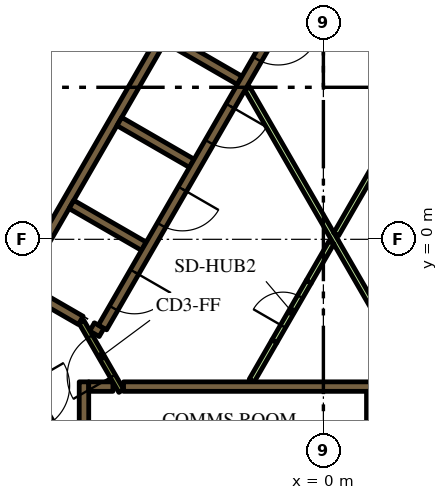
"""IFC4 building model, lengths in metres.
Left out: names, types, materials, properties, quantities, classifications, styles, units other than length and angle.
Written with IfcOpenShell. Run it as: python <this file> out.ifc"""

import sys

from ifc_helpers import new_model, si_unit, direction, frame, frame_2d, origin, place, context, subcontext, project, spatial, rectangle, extrude, element, fill, save


model = new_model("IFC4")
c1 = context("Model", 3, precision=1e-05, world=origin(), true_north=direction((0.0, 1.0)))
c2 = subcontext(c1, "Body", "Model", "MODEL_VIEW")
j1 = project(units=[si_unit("LENGTHUNIT", "METRE"), si_unit("PLANEANGLEUNIT", "RADIAN")], contexts=[c1])
p1 = place(None, origin())
s1 = spatial("IfcSite", under=j1, at=p1, CompositionType="ELEMENT")
p2 = place(p1, origin())
s2 = spatial("IfcBuilding", under=s1, at=p2, CompositionType="ELEMENT")
p3 = place(p2, frame((0.0, 0.0, 47.1)))
s3 = spatial("IfcBuildingStorey", under=s2, at=p3, CompositionType="ELEMENT", Elevation=47.1)
p4 = place(p3, frame((-15.36, -1.503, 0.0), z_axis=(0.0, 0.0, 1.0), x_axis=(0.50000389221, 0.866023156604, 0.0)))
e1 = element("IfcWall", 1, at=p4, inside=s3, PredefinedType="SOLIDWALL", context=c2, shape_type="SweptSolid", body=[
    extrude(rectangle(XDim=21.0, YDim=0.9, at=frame_2d((10.5, 0.0))), origin(), (0.0, 0.0, 1.0), 3.9),
])
p5 = place(p3, frame((-5.259, -3.875, 0.0), z_axis=(0.0, 0.0, 1.0), x_axis=(1.0, 0.0, 0.0)))
e2 = element("IfcWall", 2, at=p5, inside=s3, PredefinedType="SOLIDWALL", context=c2, shape_type="SweptSolid", body=[
    extrude(rectangle(XDim=10.489, YDim=0.25, at=frame_2d((5.244, 0.0))), origin(), (0.0, 0.0, 1.0), 3.9),
])
p6 = place(p3, frame((1.26, -4.0, 0.0), z_axis=(0.0, 0.0, 1.0), x_axis=(0.0, -1.0, 0.0)))
e3 = element("IfcWall", 3, at=p6, inside=s3, PredefinedType="SOLIDWALL", context=c2, shape_type="SweptSolid", body=[
    extrude(rectangle(XDim=2.2, YDim=0.25, at=frame_2d((1.1, 0.0))), origin(), (0.0, 0.0, 1.0), 3.9),
])
p7 = place(p3, frame((-6.3, -3.75, 0.0), z_axis=(0.0, 0.0, 1.0), x_axis=(0.0, -1.0, 0.0)))
e4 = element("IfcWall", 4, at=p7, inside=s3, PredefinedType="SOLIDWALL", context=c2, shape_type="SweptSolid", body=[
    extrude(rectangle(XDim=3.404, YDim=0.25, at=frame_2d((1.702, 0.0))), origin(), (0.0, 0.0, 1.0), 3.9),
])
p8 = place(p3, frame((-6.175, -3.875, 0.0), z_axis=(0.0, 0.0, 1.0), x_axis=(1.0, 0.0, 0.0)))
e5 = element("IfcWall", 5, at=p8, inside=s3, PredefinedType="SOLIDWALL", context=c2, shape_type="SweptSolid", body=[
    extrude(rectangle(XDim=0.637, YDim=0.25, at=frame_2d((0.318, 0.0))), origin(), (0.0, 0.0, 1.0), 3.9),
])
p9 = place(p3, frame((5.97, -2.591, 0.0), z_axis=(0.0, 0.0, 1.0), x_axis=(-0.499994469932, 0.866028596547, 0.0)))
e6 = element("IfcWall", 6, at=p9, inside=s3, PredefinedType="SOLIDWALL", context=c2, shape_type="SweptSolid", body=[
    extrude(rectangle(XDim=10.488, YDim=0.25, at=frame_2d((5.244, 0.0))), origin(), (0.0, 0.0, 1.0), 3.9),
])
p10 = place(p3, frame((-8.06, -1.311, 0.0), z_axis=(0.0, 0.0, 1.0), x_axis=(0.50000273126, 0.866023826885, 0.0)))
e7 = element("IfcWall", 7, at=p10, inside=s3, PredefinedType="SOLIDWALL", context=c2, shape_type="SweptSolid", body=[
    extrude(rectangle(XDim=10.33, YDim=0.25, at=frame_2d((5.165, 0.0))), origin(), (0.0, 0.0, 1.0), 3.9),
])
for number, where, z_axis, x_axis in (
    (8, (-2.204, 4.182, 0.0), (0.0, 0.0, 1.0), (-0.866, 0.5, 0.0)),
    (9, (-5.369, 3.1, 0.0), (0.0, 0.0, 1.0), (0.866, -0.5, 0.0)),
    (10, (-4.724, -0.182, 0.0), (0.0, 0.0, 1.0), (-0.866, 0.5, 0.0)),
):
    element("IfcWall", number, at=place(p3, frame(where, z_axis=z_axis, x_axis=x_axis)), inside=s3, PredefinedType="SOLIDWALL", context=c2, shape_type="SweptSolid", body=[
        extrude(rectangle(XDim=2.2, YDim=0.25, at=frame_2d((1.1, 0.0))), origin(), (0.0, 0.0, 1.0), 3.9),
    ])
p11 = place(p3, frame((-6.088, -2.305, 0.0), z_axis=(0.0, 0.0, 1.0), x_axis=(0.866059450854, -0.499941024108, 0.0)))
e11 = element("IfcWall", 11, at=p11, inside=s3, PredefinedType="SOLIDWALL", context=c2, shape_type="SweptSolid", body=[
    extrude(rectangle(XDim=0.29, YDim=0.25, at=frame_2d((0.145, 0.0))), origin(), (0.0, 0.0, 1.0), 3.9),
])
p12 = place(p3, frame((-7.889, -1.265, 0.0), z_axis=(0.0, 0.0, 1.0), x_axis=(0.865986741702, -0.500066958712, 0.0)))
e12 = element("IfcWall", 12, at=p12, inside=s3, PredefinedType="SOLIDWALL", context=c2, shape_type="SweptSolid", body=[
    extrude(rectangle(XDim=1.738, YDim=0.25, at=frame_2d((0.869, 0.0))), origin(), (0.0, 0.0, 1.0), 3.9),
])
p13 = place(p3, frame((-1.887, -3.718, 0.0), z_axis=(0.0, 0.0, 1.0), x_axis=(0.500057179532, 0.865992388649, 0.0)))
e13 = element("IfcWall", 13, at=p13, inside=s3, PredefinedType="PARTITIONING", context=c2, shape_type="SweptSolid", body=[
    extrude(rectangle(XDim=1.199, YDim=0.15, at=frame_2d((0.6, 0.0))), origin(), (0.0, 0.0, 1.0), 2.75),
])
p14 = place(p3, frame((2.435, -3.718, 0.0), z_axis=(0.0, 0.0, 1.0), x_axis=(-0.499985176046, 0.866033962229, 0.0)))
e14 = element("IfcWall", 14, at=p14, inside=s3, PredefinedType="PARTITIONING", context=c2, shape_type="SweptSolid", body=[
    extrude(rectangle(XDim=8.875, YDim=0.15, at=frame_2d((4.438, 0.0))), origin(), (0.0, 0.0, 1.0), 2.75),
])
p15 = place(p3, frame((0.336, 0.132, 0.0), z_axis=(0.0, 0.0, 1.0), x_axis=(0.500001957507, 0.866024273614, 0.0)))
e15 = element("IfcWall", 15, at=p15, inside=s3, PredefinedType="PARTITIONING", context=c2, shape_type="SweptSolid", body=[
    extrude(rectangle(XDim=3.881, YDim=0.15, at=frame_2d((1.941, 0.0))), origin(), (0.0, 0.0, 1.0), 2.75),
])
p16 = place(p3, frame((-0.387, -1.121, 0.0), z_axis=(0.0, 0.0, 1.0), x_axis=(0.500057179532, 0.865992388649, 0.0)))
e16 = element("IfcWall", 16, at=p16, inside=s3, PredefinedType="PARTITIONING", context=c2, shape_type="SweptSolid", body=[
    extrude(rectangle(XDim=1.199, YDim=0.15, at=frame_2d((0.6, 0.0))), origin(), (0.0, 0.0, 1.0), 2.75),
])
p17 = place(p3, frame((-6.008, 9.144, 0.0), z_axis=(0.0, 0.0, 1.0), x_axis=(-0.500006956611, -0.866021387346, 0.0)))
e17 = element("IfcWall", 17, at=p17, inside=s3, PredefinedType="SOLIDWALL", context=c2, shape_type="SweptSolid", body=[
    extrude(rectangle(XDim=9.83, YDim=0.25, at=frame_2d((4.915, 0.0))), origin(), (0.0, 0.0, 1.0), 3.9),
])
p18 = place(p17, frame((6.985, 0.0, 0.0)))
e18 = element("IfcOpeningElement", 18, at=p18, cuts=e17, PredefinedType="OPENING", context=c2, shape_type="SweptSolid", body=[
    extrude(rectangle(XDim=0.9, YDim=2.1, at=frame_2d((0.45, 1.05))), frame((0.0, 0.135, 0.0), z_axis=(0.0, -1.0, 0.0), x_axis=(1.0, 0.0, 0.0)), (0.0, 0.0, 1.0), 0.27),
])
p19 = place(p3, frame((-0.898, 6.194, 0.0), z_axis=(0.0, 0.0, 1.0), x_axis=(-0.499996202215, -0.866027596426, 0.0)))
e19 = element("IfcWall", 19, at=p19, inside=s3, PredefinedType="SOLIDWALL", context=c2, shape_type="SweptSolid", body=[
    extrude(rectangle(XDim=9.83, YDim=0.25, at=frame_2d((4.915, 0.0))), origin(), (0.0, 0.0, 1.0), 3.9),
])
p20 = place(p19, frame((0.585, 0.0, 0.0)))
e20 = element("IfcOpeningElement", 20, at=p20, cuts=e19, PredefinedType="OPENING", context=c2, shape_type="SweptSolid", body=[
    extrude(rectangle(XDim=1.1, YDim=2.1, at=frame_2d((0.55, 1.05))), frame((0.0, 0.135, 0.0), z_axis=(0.0, -1.0, 0.0), x_axis=(1.0, 0.0, 0.0)), (0.0, 0.0, 1.0), 0.27),
])
p21 = place(p19, frame((3.105, 0.0, 0.0)))
e21 = element("IfcOpeningElement", 21, at=p21, cuts=e19, PredefinedType="OPENING", context=c2, shape_type="SweptSolid", body=[
    extrude(rectangle(XDim=1.1, YDim=2.1, at=frame_2d((0.55, 1.05))), frame((0.0, 0.135, 0.0), z_axis=(0.0, -1.0, 0.0), x_axis=(1.0, 0.0, 0.0)), (0.0, 0.0, 1.0), 0.27),
])
p22 = place(p19, frame((5.625, 0.0, 0.0)))
e22 = element("IfcOpeningElement", 22, at=p22, cuts=e19, PredefinedType="OPENING", context=c2, shape_type="SweptSolid", body=[
    extrude(rectangle(XDim=1.1, YDim=2.1, at=frame_2d((0.55, 1.05))), frame((0.0, 0.135, 0.0), z_axis=(0.0, -1.0, 0.0), x_axis=(1.0, 0.0, 0.0)), (0.0, 0.0, 1.0), 0.27),
])
p23 = place(p19, frame((8.145, 0.0, 0.0)))
e23 = element("IfcOpeningElement", 23, at=p23, cuts=e19, PredefinedType="OPENING", context=c2, shape_type="SweptSolid", body=[
    extrude(rectangle(XDim=1.1, YDim=2.1, at=frame_2d((0.55, 1.05))), frame((0.0, 0.135, 0.0), z_axis=(0.0, -1.0, 0.0), x_axis=(1.0, 0.0, 0.0)), (0.0, 0.0, 1.0), 0.27),
])
p24 = place(p3, frame((-8.103, -3.466, 0.0), z_axis=(0.0, 0.0, 1.0), x_axis=(0.500078061341, -0.865980330357, 0.0)))
e24 = element("IfcWall", 24, at=p24, inside=s3, PredefinedType="SOLIDWALL", context=c2, shape_type="SweptSolid", body=[
    extrude(rectangle(XDim=2.1, YDim=0.4, at=frame_2d((1.05, 0.0))), origin(), (0.0, 0.0, 1.0), 3.9),
])
p25 = place(p24, frame((0.45, 0.0, 0.0)))
e25 = element("IfcOpeningElement", 25, at=p25, cuts=e24, PredefinedType="OPENING", context=c2, shape_type="SweptSolid", body=[
    extrude(rectangle(XDim=1.2, YDim=2.1, at=frame_2d((0.6, 1.05))), frame((0.0, 0.21, 0.0), z_axis=(0.0, -1.0, 0.0), x_axis=(1.0, 0.0, 0.0)), (0.0, 0.0, 1.0), 0.42),
])
p26 = place(p3, frame((-5.317, -3.99, 0.0), z_axis=(0.0, 0.0, 1.0), x_axis=(-0.500027713859, 0.866009402589, 0.0)))
e26 = element("IfcWall", 26, at=p26, inside=s3, PredefinedType="PARTITIONING", context=c2, shape_type="SweptSolid", body=[
    extrude(rectangle(XDim=2.1, YDim=0.15, at=frame_2d((1.05, 0.0))), origin(), (0.0, 0.0, 1.0), 3.9),
])
p27 = place(p26, frame((0.45, 0.0, 0.0)))
e27 = element("IfcOpeningElement", 27, at=p27, cuts=e26, PredefinedType="OPENING", context=c2, shape_type="SweptSolid", body=[
    extrude(rectangle(XDim=1.2, YDim=2.1, at=frame_2d((0.6, 1.05))), frame((0.0, 0.085, 0.0), z_axis=(0.0, -1.0, 0.0), x_axis=(1.0, 0.0, 0.0)), (0.0, 0.0, 1.0), 0.17),
])
p28 = place(p3, frame((-1.287, -2.679, 0.0), z_axis=(0.0, 0.0, 1.0), x_axis=(0.499961193289, 0.866047807691, 0.0)))
e28 = element("IfcWall", 28, at=p28, inside=s3, PredefinedType="PARTITIONING", context=c2, shape_type="SweptSolid", body=[
    extrude(rectangle(XDim=1.8, YDim=0.15, at=frame_2d((0.9, 0.0))), origin(), (0.0, 0.0, 1.0), 2.75),
])
p29 = place(p28, frame((0.45, 0.0, 0.0)))
e29 = element("IfcOpeningElement", 29, at=p29, cuts=e28, PredefinedType="OPENING", context=c2, shape_type="SweptSolid", body=[
    extrude(rectangle(XDim=0.9, YDim=2.1, at=frame_2d((0.45, 1.05))), frame((0.0, 0.085, 0.0), z_axis=(0.0, -1.0, 0.0), x_axis=(1.0, 0.0, 0.0)), (0.0, 0.0, 1.0), 0.17),
])
p30 = place(p3, frame((-19.081, -3.9, 0.0), z_axis=(0.0, 0.0, 1.0), x_axis=(0.499998313975, 0.866026377209, 0.0)))
e30 = element("IfcWall", 30, at=p30, inside=s3, PredefinedType="PARTITIONING", context=c2, shape_type="SweptSolid", body=[
    extrude(rectangle(XDim=25.766, YDim=0.15, at=frame_2d((12.883, 0.0))), origin(), (0.0, 0.0, 1.0), 2.75),
])
p31 = place(p30, frame((16.196, 0.0, 0.0)))
e31 = element("IfcOpeningElement", 31, at=p31, cuts=e30, PredefinedType="OPENING", context=c2, shape_type="SweptSolid", body=[
    extrude(rectangle(XDim=1.0, YDim=2.1, at=frame_2d((0.5, 1.05))), frame((0.0, 0.085, 0.0), z_axis=(0.0, -1.0, 0.0), x_axis=(1.0, 0.0, 0.0)), (0.0, 0.0, 1.0), 0.17),
])
p32 = place(p30, frame((14.889, 0.0, 0.0)))
e32 = element("IfcOpeningElement", 32, at=p32, cuts=e30, PredefinedType="OPENING", context=c2, shape_type="SweptSolid", body=[
    extrude(rectangle(XDim=1.0, YDim=2.1, at=frame_2d((0.5, 1.05))), frame((0.0, 0.085, 0.0), z_axis=(0.0, -1.0, 0.0), x_axis=(1.0, 0.0, 0.0)), (0.0, 0.0, 1.0), 0.17),
])
p33 = place(p30, frame((3.698, 0.0, 0.0)))
e33 = element("IfcOpeningElement", 33, at=p33, cuts=e30, PredefinedType="OPENING", context=c2, shape_type="SweptSolid", body=[
    extrude(rectangle(XDim=1.1, YDim=2.1, at=frame_2d((0.55, 1.05))), frame((0.0, 0.085, 0.0), z_axis=(0.0, -1.0, 0.0), x_axis=(1.0, 0.0, 0.0)), (0.0, 0.0, 1.0), 0.17),
])
p34 = place(p30, frame((2.392, 0.0, 0.0)))
e34 = element("IfcOpeningElement", 34, at=p34, cuts=e30, PredefinedType="OPENING", context=c2, shape_type="SweptSolid", body=[
    extrude(rectangle(XDim=1.0, YDim=2.1, at=frame_2d((0.5, 1.05))), frame((0.0, 0.085, 0.0), z_axis=(0.0, -1.0, 0.0), x_axis=(1.0, 0.0, 0.0)), (0.0, 0.0, 1.0), 0.17),
])
p35 = place(p20, origin())
e35 = element("IfcDoor", 35, at=p35, inside=s3, OperationType="DOUBLE_DOOR_SLIDING", PredefinedType="DOOR", context=c2, shape_type="SweptSolid", body=[
    extrude(rectangle(XDim=1.1, YDim=2.1, at=frame_2d((0.55, 1.05))), frame((0.0, 0.025, 0.0), z_axis=(0.0, -1.0, 0.0), x_axis=(1.0, 0.0, 0.0)), (0.0, 0.0, 1.0), 0.05),
])
fill(e20, e35)
p36 = place(p21, origin())
e36 = element("IfcDoor", 36, at=p36, inside=s3, OperationType="DOUBLE_DOOR_SLIDING", PredefinedType="DOOR", context=c2, shape_type="SweptSolid", body=[
    extrude(rectangle(XDim=1.1, YDim=2.1, at=frame_2d((0.55, 1.05))), frame((0.0, 0.025, 0.0), z_axis=(0.0, -1.0, 0.0), x_axis=(1.0, 0.0, 0.0)), (0.0, 0.0, 1.0), 0.05),
])
fill(e21, e36)
p37 = place(p22, origin())
e37 = element("IfcDoor", 37, at=p37, inside=s3, OperationType="DOUBLE_DOOR_SLIDING", PredefinedType="DOOR", context=c2, shape_type="SweptSolid", body=[
    extrude(rectangle(XDim=1.1, YDim=2.1, at=frame_2d((0.55, 1.05))), frame((0.0, 0.025, 0.0), z_axis=(0.0, -1.0, 0.0), x_axis=(1.0, 0.0, 0.0)), (0.0, 0.0, 1.0), 0.05),
])
fill(e22, e37)
p38 = place(p23, origin())
e38 = element("IfcDoor", 38, at=p38, inside=s3, OperationType="DOUBLE_DOOR_SLIDING", PredefinedType="DOOR", context=c2, shape_type="SweptSolid", body=[
    extrude(rectangle(XDim=1.1, YDim=2.1, at=frame_2d((0.55, 1.05))), frame((0.0, 0.025, 0.0), z_axis=(0.0, -1.0, 0.0), x_axis=(1.0, 0.0, 0.0)), (0.0, 0.0, 1.0), 0.05),
])
fill(e23, e38)
p39 = place(p27, origin())
e39 = element("IfcDoor", 39, at=p39, inside=s3, OperationType="SINGLE_SWING_LEFT", PredefinedType="DOOR", context=c2, shape_type="SweptSolid", body=[
    extrude(rectangle(XDim=1.2, YDim=2.1, at=frame_2d((0.6, 1.05))), frame((0.0, 0.025, 0.0), z_axis=(0.0, -1.0, 0.0), x_axis=(1.0, 0.0, 0.0)), (0.0, 0.0, 1.0), 0.05),
])
fill(e27, e39)
p40 = place(p29, origin())
e40 = element("IfcDoor", 40, at=p40, inside=s3, OperationType="SINGLE_SWING_LEFT", PredefinedType="DOOR", context=c2, shape_type="SweptSolid", body=[
    extrude(rectangle(XDim=0.9, YDim=2.1, at=frame_2d((0.45, 1.05))), frame((0.0, 0.025, 0.0), z_axis=(0.0, -1.0, 0.0), x_axis=(1.0, 0.0, 0.0)), (0.0, 0.0, 1.0), 0.05),
])
fill(e29, e40)
save(model, sys.argv[1])
